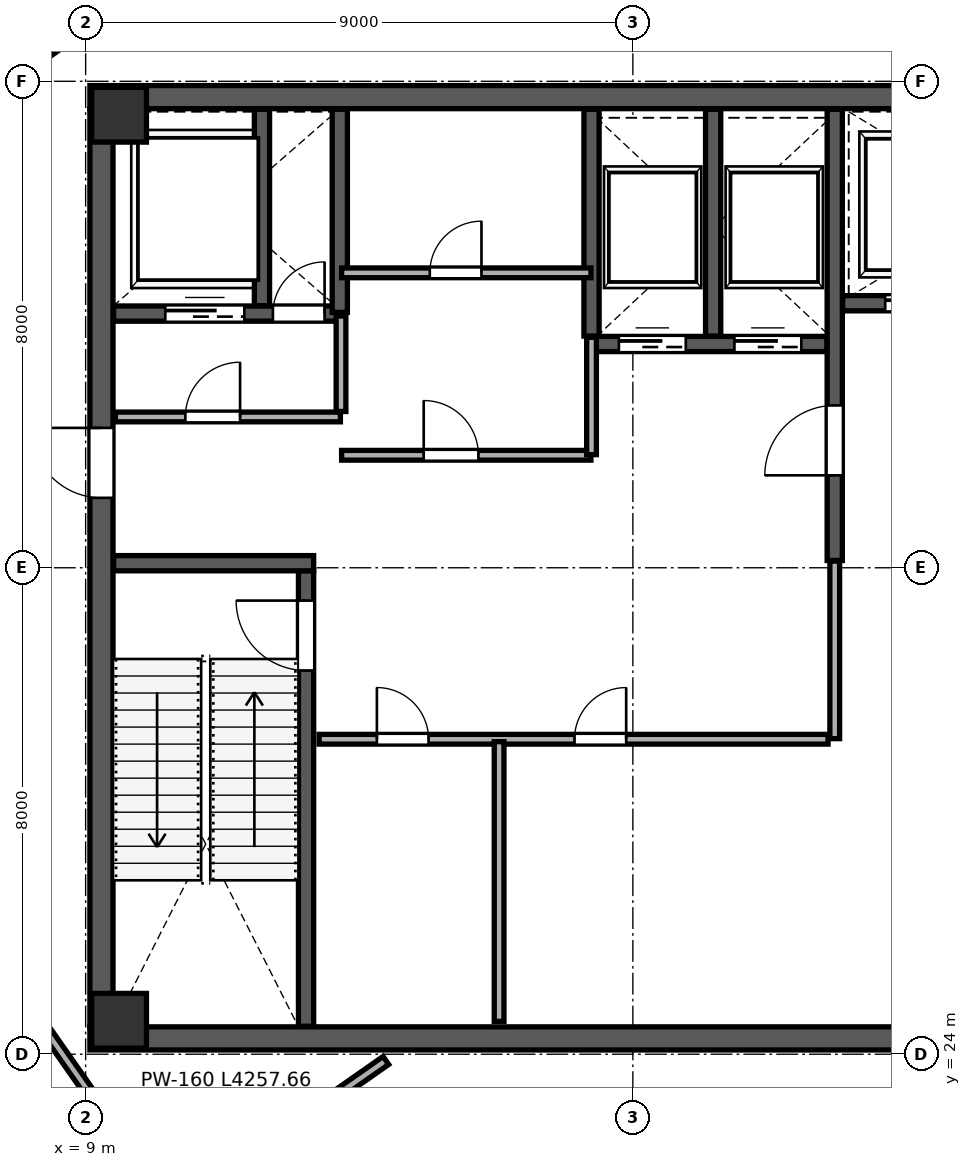
"""IFC4 building model, lengths in metres.
Left out: names, types, materials, properties, quantities, classifications, styles, units other than length and angle.
Written with IfcOpenShell. Run it as: python <this file> out.ifc"""

import sys

from ifc_helpers import new_model, si_unit, direction, frame, frame_2d, origin, origin_2d, place, context, subcontext, project, spatial, rectangle, extrude, source, transform, mapped, element, fill, save


model = new_model("IFC4")
c1 = context("Model", 3, precision=1e-05, world=origin(), true_north=direction((0.0, 1.0)))
c2 = subcontext(c1, "Body", "Model", "MODEL_VIEW")
j1 = project(units=[si_unit("LENGTHUNIT", "METRE"), si_unit("PLANEANGLEUNIT", "RADIAN")], contexts=[c1])
p1 = place(None, origin())
s1 = spatial("IfcSite", under=j1, at=p1, CompositionType="ELEMENT")
p2 = place(p1, origin())
s2 = spatial("IfcBuilding", under=s1, at=p2, CompositionType="ELEMENT")
p3 = place(p2, frame((0.0, 0.0, 293.8)))
s3 = spatial("IfcBuildingStorey", under=s2, at=p3, CompositionType="ELEMENT", Elevation=293.8)
m1 = source(origin(), c2, "Body", "SweptSolid", [
    extrude(rectangle(XDim=0.9, YDim=0.9, at=origin_2d()), origin(), (0.0, 0.0, 1.0), 4.999),
])
for number, where, z_axis, x_axis in (
    (1, (9.55, 24.55, 0.001), (0.0, 0.0, 1.0), (1.0, 0.0, 0.0)),
    (2, (9.55, 39.45, 0.001), (0.0, 0.0, 1.0), (1.0, 0.0, 0.0)),
):
    element("IfcColumn", number, at=place(p3, frame(where, z_axis=z_axis, x_axis=x_axis)), inside=s3, PredefinedType="COLUMN", context=c2, shape_type="MappedRepresentation", body=[
        mapped(m1, transform((0.0, 0.0, 0.0), scale=1.0)),
    ])
p4 = place(p3, frame((9.26, 24.45, 0.0), z_axis=(0.0, 0.0, 1.0), x_axis=(0.0, 1.0, 0.0)))
e3 = element("IfcWall", 3, at=p4, inside=s3, PredefinedType="SHEAR", context=c2, shape_type="SweptSolid", body=[
    extrude(rectangle(XDim=15.1, YDim=0.38, at=frame_2d((7.55, 0.0))), origin(), (0.0, 0.0, 1.0), 4.76),
])
p5 = place(p4, frame((8.7, 0.0, 0.0)))
e4 = element("IfcOpeningElement", 4, at=p5, cuts=e3, PredefinedType="OPENING", context=c2, shape_type="SweptSolid", body=[
    extrude(rectangle(XDim=1.15, YDim=2.2, at=frame_2d((0.575, 1.1))), frame((0.0, 0.2, 0.0), z_axis=(0.0, -1.0, 0.0), x_axis=(1.0, 0.0, 0.0)), (0.0, 0.0, 1.0), 0.4),
])
for number, where, z_axis, x_axis in (
    (5, (9.07, 24.26, 0.0), (0.0, 0.0, 1.0), (1.0, 0.0, 0.0)),
    (6, (9.07, 39.74, 0.0), (0.0, 0.0, 1.0), (1.0, 0.0, 0.0)),
):
    element("IfcWall", number, at=place(p3, frame(where, z_axis=z_axis, x_axis=x_axis)), inside=s3, PredefinedType="SHEAR", context=c2, shape_type="SweptSolid", body=[
        extrude(rectangle(XDim=17.86, YDim=0.38, at=frame_2d((8.93, 0.0))), origin(), (0.0, 0.0, 1.0), 4.76),
    ])
p6 = place(p3, frame((12.625, 24.46, 0.0), z_axis=(0.0, 0.0, 1.0), x_axis=(0.0, 1.0, 0.0)))
e7 = element("IfcWall", 7, at=p6, inside=s3, PredefinedType="SHEAR", context=c2, shape_type="SweptSolid", body=[
    extrude(rectangle(XDim=7.49, YDim=0.25, at=frame_2d((3.745, 0.0))), origin(), (0.0, 0.0, 1.0), 4.76),
])
p7 = place(p6, frame((5.85, 0.0, 0.0)))
e8 = element("IfcOpeningElement", 8, at=p7, cuts=e7, PredefinedType="OPENING", context=c2, shape_type="SweptSolid", body=[
    extrude(rectangle(XDim=1.15, YDim=2.2, at=frame_2d((0.575, 1.1))), frame((0.0, 0.135, 0.0), z_axis=(0.0, -1.0, 0.0), x_axis=(1.0, 0.0, 0.0)), (0.0, 0.0, 1.0), 0.27),
])
p8 = place(p3, frame((9.46, 32.075, 0.0), z_axis=(0.0, 0.0, 1.0), x_axis=(1.0, 0.0, 0.0)))
e9 = element("IfcWall", 9, at=p8, inside=s3, PredefinedType="SHEAR", context=c2, shape_type="SweptSolid", body=[
    extrude(rectangle(XDim=3.29, YDim=0.25, at=frame_2d((1.645, 0.0))), origin(), (0.0, 0.0, 1.0), 4.76),
])
p9 = place(p3, frame((21.32, 32.12, 0.0), z_axis=(0.0, 0.0, 1.0), x_axis=(0.0, 1.0, 0.0)))
e10 = element("IfcWall", 10, at=p9, inside=s3, PredefinedType="SHEAR", context=c2, shape_type="SweptSolid", body=[
    extrude(rectangle(XDim=7.42, YDim=0.25, at=frame_2d((3.71, 0.0))), origin(), (0.0, 0.0, 1.0), 4.76),
])
p10 = place(p9, frame((1.4, 0.0, 0.0)))
e11 = element("IfcOpeningElement", 11, at=p10, cuts=e10, PredefinedType="OPENING", context=c2, shape_type="SweptSolid", body=[
    extrude(rectangle(XDim=1.15, YDim=2.2, at=frame_2d((0.575, 1.1))), frame((0.0, 0.135, 0.0), z_axis=(0.0, -1.0, 0.0), x_axis=(1.0, 0.0, 0.0)), (0.0, 0.0, 1.0), 0.27),
])
p11 = place(p3, frame((9.46, 36.18, 0.0), z_axis=(0.0, 0.0, 1.0), x_axis=(1.0, 0.0, 0.0)))
e12 = element("IfcWall", 12, at=p11, inside=s3, PredefinedType="SHEAR", context=c2, shape_type="SweptSolid", body=[
    extrude(rectangle(XDim=3.79, YDim=0.25, at=frame_2d((1.895, 0.0))), origin(), (0.0, 0.0, 1.0), 4.76),
])
p12 = place(p11, frame((2.62, 0.0, 0.0)))
e13 = element("IfcOpeningElement", 13, at=p12, cuts=e12, PredefinedType="OPENING", context=c2, shape_type="SweptSolid", body=[
    extrude(rectangle(XDim=0.85, YDim=2.1, at=frame_2d((0.425, 1.05))), frame((0.0, 0.135, 0.0), z_axis=(0.0, -1.0, 0.0), x_axis=(1.0, 0.0, 0.0)), (0.0, 0.0, 1.0), 0.27),
])
p13 = place(p11, frame((0.85, 0.0, 0.0)))
e14 = element("IfcOpeningElement", 14, at=p13, cuts=e12, PredefinedType="OPENING", context=c2, shape_type="SweptSolid", body=[
    extrude(rectangle(XDim=1.3, YDim=2.25, at=frame_2d((0.65, 1.125))), frame((0.0, 0.135, 0.0), z_axis=(0.0, -1.0, 0.0), x_axis=(1.0, 0.0, 0.0)), (0.0, 0.0, 1.0), 0.27),
])
p14 = place(p3, frame((11.9, 36.31, 0.0), z_axis=(0.0, 0.0, 1.0), x_axis=(0.0, 1.0, 0.0)))
e15 = element("IfcWall", 15, at=p14, inside=s3, PredefinedType="SHEAR", context=c2, shape_type="SweptSolid", body=[
    extrude(rectangle(XDim=3.23, YDim=0.25, at=frame_2d((1.615, 0.0))), origin(), (0.0, 0.0, 1.0), 4.76),
])
p15 = place(p3, frame((21.45, 36.35, 0.0), z_axis=(0.0, 0.0, 1.0), x_axis=(1.0, 0.0, 0.0)))
e16 = element("IfcWall", 16, at=p15, inside=s3, PredefinedType="SHEAR", context=c2, shape_type="SweptSolid", body=[
    extrude(rectangle(XDim=5.09, YDim=0.25, at=frame_2d((2.545, 0.0))), origin(), (0.0, 0.0, 1.0), 4.76),
])
p16 = place(p15, frame((0.7, 0.0, 0.0)))
e17 = element("IfcOpeningElement", 17, at=p16, cuts=e16, PredefinedType="OPENING", context=c2, shape_type="SweptSolid", body=[
    extrude(rectangle(XDim=1.2, YDim=2.2, at=frame_2d((0.6, 1.1))), frame((0.0, 0.135, 0.0), z_axis=(0.0, -1.0, 0.0), x_axis=(1.0, 0.0, 0.0)), (0.0, 0.0, 1.0), 0.27),
])
p17 = place(p15, frame((3.25, 0.0, 0.0)))
e18 = element("IfcOpeningElement", 18, at=p17, cuts=e16, PredefinedType="OPENING", context=c2, shape_type="SweptSolid", body=[
    extrude(rectangle(XDim=1.2, YDim=2.2, at=frame_2d((0.6, 1.1))), frame((0.0, 0.135, 0.0), z_axis=(0.0, -1.0, 0.0), x_axis=(1.0, 0.0, 0.0)), (0.0, 0.0, 1.0), 0.27),
])
p18 = place(p3, frame((13.18, 36.2, 0.0), z_axis=(0.0, 0.0, 1.0), x_axis=(0.0, 1.0, 0.0)))
e19 = element("IfcWall", 19, at=p18, inside=s3, PredefinedType="SHEAR", context=c2, shape_type="SweptSolid", body=[
    extrude(rectangle(XDim=3.34, YDim=0.25, at=frame_2d((1.67, 0.0))), origin(), (0.0, 0.0, 1.0), 4.76),
])
p19 = place(p3, frame((17.32, 35.68, 0.0), z_axis=(0.0, 0.0, 1.0), x_axis=(1.0, 0.0, 0.0)))
e20 = element("IfcWall", 20, at=p19, inside=s3, PredefinedType="SHEAR", context=c2, shape_type="SweptSolid", body=[
    extrude(rectangle(XDim=3.87, YDim=0.25, at=frame_2d((1.935, 0.0))), origin(), (0.0, 0.0, 1.0), 4.76),
])
p20 = place(p19, frame((0.45, 0.0, 0.0)))
e21 = element("IfcOpeningElement", 21, at=p20, cuts=e20, PredefinedType="OPENING", context=c2, shape_type="SweptSolid", body=[
    extrude(rectangle(XDim=1.1, YDim=2.2, at=frame_2d((0.55, 1.1))), frame((0.0, 0.135, 0.0), z_axis=(0.0, -1.0, 0.0), x_axis=(1.0, 0.0, 0.0)), (0.0, 0.0, 1.0), 0.27),
])
p21 = place(p19, frame((2.35, 0.0, 0.0)))
e22 = element("IfcOpeningElement", 22, at=p21, cuts=e20, PredefinedType="OPENING", context=c2, shape_type="SweptSolid", body=[
    extrude(rectangle(XDim=1.1, YDim=2.2, at=frame_2d((0.55, 1.1))), frame((0.0, 0.135, 0.0), z_axis=(0.0, -1.0, 0.0), x_axis=(1.0, 0.0, 0.0)), (0.0, 0.0, 1.0), 0.27),
])
for number, where, z_axis, x_axis in (
    (23, (17.32, 35.81, 0.0), (0.0, 0.0, 1.0), (0.0, 1.0, 0.0)),
    (24, (19.32, 35.81, 0.0), (0.0, 0.0, 1.0), (0.0, 1.0, 0.0)),
):
    element("IfcWall", number, at=place(p3, frame(where, z_axis=z_axis, x_axis=x_axis)), inside=s3, PredefinedType="SHEAR", context=c2, shape_type="SweptSolid", body=[
        extrude(rectangle(XDim=3.73, YDim=0.25, at=frame_2d((1.865, 0.0))), origin(), (0.0, 0.0, 1.0), 4.76),
    ])
p22 = place(p3, frame((9.49, 34.48, 0.0), z_axis=(0.0, 0.0, 1.0), x_axis=(1.0, 0.0, 0.0)))
e25 = element("IfcWall", 25, at=p22, inside=s3, PredefinedType="PARTITIONING", context=c2, shape_type="SweptSolid", body=[
    extrude(rectangle(XDim=3.7, YDim=0.16, at=frame_2d((1.85, 0.0))), origin(), (0.0, 0.0, 1.0), 4.76),
])
p23 = place(p22, frame((1.15, 0.0, 0.0)))
e26 = element("IfcOpeningElement", 26, at=p23, cuts=e25, PredefinedType="OPENING", context=c2, shape_type="SweptSolid", body=[
    extrude(rectangle(XDim=0.9, YDim=2.15, at=frame_2d((0.45, 1.075))), frame((0.0, 0.09, 0.0), z_axis=(0.0, -1.0, 0.0), x_axis=(1.0, 0.0, 0.0)), (0.0, 0.0, 1.0), 0.18),
])
p24 = place(p3, frame((13.2, 34.57, 0.0), z_axis=(0.0, 0.0, 1.0), x_axis=(0.0, 1.0, 0.0)))
e27 = element("IfcWall", 27, at=p24, inside=s3, PredefinedType="PARTITIONING", context=c2, shape_type="SweptSolid", body=[
    extrude(rectangle(XDim=1.57, YDim=0.16, at=frame_2d((0.785, 0.0))), origin(), (0.0, 0.0, 1.0), 4.76),
])
p25 = place(p3, frame((13.21, 33.85, 0.0), z_axis=(0.0, 0.0, 1.0), x_axis=(1.0, 0.0, 0.0)))
e28 = element("IfcWall", 28, at=p25, inside=s3, PredefinedType="PARTITIONING", context=c2, shape_type="SweptSolid", body=[
    extrude(rectangle(XDim=4.1, YDim=0.16, at=frame_2d((2.05, 0.0))), origin(), (0.0, 0.0, 1.0), 4.76),
])
p26 = place(p25, frame((1.35, 0.0, 0.0)))
e29 = element("IfcOpeningElement", 29, at=p26, cuts=e28, PredefinedType="OPENING", context=c2, shape_type="SweptSolid", body=[
    extrude(rectangle(XDim=0.9, YDim=2.15, at=frame_2d((0.45, 1.075))), frame((0.0, 0.09, 0.0), z_axis=(0.0, -1.0, 0.0), x_axis=(1.0, 0.0, 0.0)), (0.0, 0.0, 1.0), 0.18),
])
p27 = place(p3, frame((17.32, 33.86, 0.0), z_axis=(0.0, 0.0, 1.0), x_axis=(0.0, 1.0, 0.0)))
e30 = element("IfcWall", 30, at=p27, inside=s3, PredefinedType="PARTITIONING", context=c2, shape_type="SweptSolid", body=[
    extrude(rectangle(XDim=1.93, YDim=0.16, at=frame_2d((0.965, 0.0))), origin(), (0.0, 0.0, 1.0), 4.76),
])
p28 = place(p3, frame((13.21, 36.85, 0.0), z_axis=(0.0, 0.0, 1.0), x_axis=(1.0, 0.0, 0.0)))
e31 = element("IfcWall", 31, at=p28, inside=s3, PredefinedType="PARTITIONING", context=c2, shape_type="SweptSolid", body=[
    extrude(rectangle(XDim=4.1, YDim=0.16, at=frame_2d((2.05, 0.0))), origin(), (0.0, 0.0, 1.0), 4.76),
])
p29 = place(p28, frame((1.45, 0.0, 0.0)))
e32 = element("IfcOpeningElement", 32, at=p29, cuts=e31, PredefinedType="OPENING", context=c2, shape_type="SweptSolid", body=[
    extrude(rectangle(XDim=0.85, YDim=2.1, at=frame_2d((0.425, 1.05))), frame((0.0, 0.09, 0.0), z_axis=(0.0, -1.0, 0.0), x_axis=(1.0, 0.0, 0.0)), (0.0, 0.0, 1.0), 0.18),
])
p30 = place(p3, frame((12.84, 29.18, 0.0), z_axis=(0.0, 0.0, 1.0), x_axis=(1.0, 0.0, 0.0)))
e33 = element("IfcWall", 33, at=p30, inside=s3, PredefinedType="PARTITIONING", context=c2, shape_type="SweptSolid", body=[
    extrude(rectangle(XDim=8.37, YDim=0.16, at=frame_2d((4.185, 0.0))), origin(), (0.0, 0.0, 1.0), 4.76),
])
p31 = place(p30, frame((0.95, 0.0, 0.0)))
e34 = element("IfcOpeningElement", 34, at=p31, cuts=e33, PredefinedType="OPENING", context=c2, shape_type="SweptSolid", body=[
    extrude(rectangle(XDim=0.85, YDim=2.1, at=frame_2d((0.425, 1.05))), frame((0.0, 0.09, 0.0), z_axis=(0.0, -1.0, 0.0), x_axis=(1.0, 0.0, 0.0)), (0.0, 0.0, 1.0), 0.18),
])
p32 = place(p30, frame((4.2, 0.0, 0.0)))
e35 = element("IfcOpeningElement", 35, at=p32, cuts=e33, PredefinedType="OPENING", context=c2, shape_type="SweptSolid", body=[
    extrude(rectangle(XDim=0.85, YDim=2.1, at=frame_2d((0.425, 1.05))), frame((0.0, 0.09, 0.0), z_axis=(0.0, -1.0, 0.0), x_axis=(1.0, 0.0, 0.0)), (0.0, 0.0, 1.0), 0.18),
])
p33 = place(p3, frame((15.8, 24.54, 0.0), z_axis=(0.0, 0.0, 1.0), x_axis=(0.0, 1.0, 0.0)))
e36 = element("IfcWall", 36, at=p33, inside=s3, PredefinedType="PARTITIONING", context=c2, shape_type="SweptSolid", body=[
    extrude(rectangle(XDim=4.6, YDim=0.16, at=frame_2d((2.3, 0.0))), origin(), (0.0, 0.0, 1.0), 4.76),
])
p34 = place(p3, frame((21.32, 29.19, 0.0), z_axis=(0.0, 0.0, 1.0), x_axis=(0.0, 1.0, 0.0)))
e37 = element("IfcWall", 37, at=p34, inside=s3, PredefinedType="PARTITIONING", context=c2, shape_type="SweptSolid", body=[
    extrude(rectangle(XDim=2.92, YDim=0.16, at=frame_2d((1.46, 0.0))), origin(), (0.0, 0.0, 1.0), 4.76),
])
p35 = place(p3, frame((3.758, 30.942, 0.0), z_axis=(0.0, 0.0, 1.0), x_axis=(0.573575634469, -0.819152605772, 0.0)))
e38 = element("IfcWall", 38, at=p35, inside=s3, PredefinedType="PARTITIONING", context=c2, shape_type="SweptSolid", body=[
    extrude(rectangle(XDim=11.57, YDim=0.16, at=frame_2d((5.785, 0.0))), origin(), (0.0, 0.0, 1.0), 4.76),
])
p36 = place(p35, frame((1.15, 0.0, 0.0)))
e39 = element("IfcOpeningElement", 39, at=p36, cuts=e38, PredefinedType="OPENING", context=c2, shape_type="SweptSolid", body=[
    extrude(rectangle(XDim=0.95, YDim=2.15, at=frame_2d((0.475, 1.075))), frame((0.0, 0.09, 0.0), z_axis=(0.0, -1.0, 0.0), x_axis=(1.0, 0.0, 0.0)), (0.0, 0.0, 1.0), 0.18),
])
p37 = place(p3, frame((10.45, 21.455, 0.0), z_axis=(0.0, 0.0, 1.0), x_axis=(0.819110678768, 0.573635507903, 0.0)))
e40 = element("IfcWall", 40, at=p37, inside=s3, PredefinedType="PARTITIONING", context=c2, shape_type="SweptSolid", body=[
    extrude(rectangle(XDim=4.258, YDim=0.16, at=frame_2d((2.129, 0.0))), origin(), (0.0, 0.0, 1.0), 4.76),
])
p38 = place(p3, frame((21.918, 49.884, 0.0), z_axis=(0.0, 0.0, 1.0), x_axis=(0.57358495776, -0.819146077468, 0.0)))
e41 = element("IfcWall", 41, at=p38, inside=s3, PredefinedType="PARTITIONING", context=c2, shape_type="SweptSolid", body=[
    extrude(rectangle(XDim=25.79, YDim=0.1, at=frame_2d((12.895, 0.0))), origin(), (0.0, 0.0, 1.0), 4.76),
])
p39 = place(p38, frame((9.2, 0.0, 0.0)))
e42 = element("IfcOpeningElement", 42, at=p39, cuts=e41, PredefinedType="OPENING", context=c2, shape_type="SweptSolid", body=[
    extrude(rectangle(XDim=0.95, YDim=2.15, at=frame_2d((0.475, 1.075))), frame((0.0, 0.06, 0.0), z_axis=(0.0, -1.0, 0.0), x_axis=(1.0, 0.0, 0.0)), (0.0, 0.0, 1.0), 0.12),
])
p40 = place(p3, frame((2.071, 36.036, 0.0), z_axis=(0.0, 0.0, 1.0), x_axis=(0.819154854942, 0.573572422302, 0.0)))
e43 = element("IfcWall", 43, at=p40, inside=s3, PredefinedType="PARTITIONING", context=c2, shape_type="SweptSolid", body=[
    extrude(rectangle(XDim=29.62, YDim=0.115, at=frame_2d((14.81, 0.0))), origin(), (0.0, 0.0, 1.0), 4.76),
])
p41 = place(p40, frame((4.2, 0.0, 0.0)))
e44 = element("IfcOpeningElement", 44, at=p41, cuts=e43, PredefinedType="OPENING", context=c2, shape_type="SweptSolid", body=[
    extrude(rectangle(XDim=0.95, YDim=2.15, at=frame_2d((0.475, 1.075))), frame((0.0, 0.067, 0.0), z_axis=(0.0, -1.0, 0.0), x_axis=(1.0, 0.0, 0.0)), (0.0, 0.0, 1.0), 0.135),
])
m2 = source(origin(), c2, "Body", "SweptSolid", [
    extrude(rectangle(XDim=1.15, YDim=2.2, at=frame_2d((0.575, 1.1))), frame((0.0, 0.025, 0.0), z_axis=(0.0, -1.0, 0.0), x_axis=(1.0, 0.0, 0.0)), (0.0, 0.0, 1.0), 0.05),
])
p42 = place(p7, origin())
e45 = element("IfcDoor", 45, at=p42, inside=s3, OperationType="SINGLE_SWING_RIGHT", PredefinedType="DOOR", context=c2, shape_type="MappedRepresentation", body=[
    mapped(m2, transform((0.0, 0.0, 0.0), scale=1.0)),
])
fill(e8, e45)
m3 = source(origin(), c2, "Body", "SweptSolid", [
    extrude(rectangle(XDim=1.15, YDim=2.2, at=frame_2d((0.575, 1.1))), frame((0.0, 0.025, 0.0), z_axis=(0.0, -1.0, 0.0), x_axis=(1.0, 0.0, 0.0)), (0.0, 0.0, 1.0), 0.05),
])
p43 = place(p10, origin())
e46 = element("IfcDoor", 46, at=p43, inside=s3, OperationType="SINGLE_SWING_LEFT", PredefinedType="DOOR", context=c2, shape_type="MappedRepresentation", body=[
    mapped(m3, transform((0.0, 0.0, 0.0), scale=1.0)),
])
fill(e11, e46)
p44 = place(p5, origin())
e47 = element("IfcDoor", 47, at=p44, inside=s3, OperationType="SINGLE_SWING_RIGHT", PredefinedType="DOOR", context=c2, shape_type="MappedRepresentation", body=[
    mapped(m3, transform((0.0, 0.0, 0.0), scale=1.0)),
])
fill(e4, e47)
m4 = source(origin(), c2, "Body", "SweptSolid", [
    extrude(rectangle(XDim=0.85, YDim=2.1, at=frame_2d((0.425, 1.05))), frame((0.0, 0.025, 0.0), z_axis=(0.0, -1.0, 0.0), x_axis=(1.0, 0.0, 0.0)), (0.0, 0.0, 1.0), 0.05),
])
p45 = place(p12, origin())
e48 = element("IfcDoor", 48, at=p45, inside=s3, OperationType="SINGLE_SWING_RIGHT", PredefinedType="DOOR", context=c2, shape_type="MappedRepresentation", body=[
    mapped(m4, transform((0.0, 0.0, 0.0), scale=1.0)),
])
fill(e13, e48)
m5 = source(origin(), c2, "Body", "SweptSolid", [
    extrude(rectangle(XDim=1.1, YDim=2.2, at=frame_2d((0.55, 1.1))), frame((0.0, 0.025, 0.0), z_axis=(0.0, -1.0, 0.0), x_axis=(1.0, 0.0, 0.0)), (0.0, 0.0, 1.0), 0.05),
])
p46 = place(p20, origin())
e49 = element("IfcDoor", 49, at=p46, inside=s3, OperationType="SLIDING_TO_LEFT", PredefinedType="DOOR", context=c2, shape_type="MappedRepresentation", body=[
    mapped(m5, transform((0.0, 0.0, 0.0), scale=1.0)),
])
fill(e21, e49)
p47 = place(p21, origin())
e50 = element("IfcDoor", 50, at=p47, inside=s3, OperationType="SLIDING_TO_RIGHT", PredefinedType="DOOR", context=c2, shape_type="MappedRepresentation", body=[
    mapped(m5, transform((0.0, 0.0, 0.0), scale=1.0)),
])
fill(e22, e50)
m6 = source(origin(), c2, "Body", "SweptSolid", [
    extrude(rectangle(XDim=1.2, YDim=2.2, at=frame_2d((0.6, 1.1))), frame((0.0, 0.025, 0.0), z_axis=(0.0, -1.0, 0.0), x_axis=(1.0, 0.0, 0.0)), (0.0, 0.0, 1.0), 0.05),
])
p48 = place(p16, origin())
e51 = element("IfcDoor", 51, at=p48, inside=s3, OperationType="SLIDING_TO_LEFT", PredefinedType="DOOR", context=c2, shape_type="MappedRepresentation", body=[
    mapped(m6, transform((0.0, 0.0, 0.0), scale=1.0)),
])
fill(e17, e51)
m7 = source(origin(), c2, "Body", "SweptSolid", [
    extrude(rectangle(XDim=1.3, YDim=2.25, at=frame_2d((0.65, 1.125))), frame((0.0, 0.025, 0.0), z_axis=(0.0, -1.0, 0.0), x_axis=(1.0, 0.0, 0.0)), (0.0, 0.0, 1.0), 0.05),
])
p49 = place(p13, origin())
e52 = element("IfcDoor", 52, at=p49, inside=s3, OperationType="SLIDING_TO_LEFT", PredefinedType="DOOR", context=c2, shape_type="MappedRepresentation", body=[
    mapped(m7, transform((0.0, 0.0, 0.0), scale=1.0)),
])
fill(e14, e52)
m8 = source(origin(), c2, "Body", "SweptSolid", [
    extrude(rectangle(XDim=0.9, YDim=2.15, at=frame_2d((0.45, 1.075))), frame((0.0, 0.025, 0.0), z_axis=(0.0, -1.0, 0.0), x_axis=(1.0, 0.0, 0.0)), (0.0, 0.0, 1.0), 0.05),
])
p50 = place(p23, origin())
e53 = element("IfcDoor", 53, at=p50, inside=s3, OperationType="SINGLE_SWING_RIGHT", PredefinedType="DOOR", context=c2, shape_type="MappedRepresentation", body=[
    mapped(m8, transform((0.0, 0.0, 0.0), scale=1.0)),
])
fill(e26, e53)
p51 = place(p26, origin())
e54 = element("IfcDoor", 54, at=p51, inside=s3, OperationType="SINGLE_SWING_LEFT", PredefinedType="DOOR", context=c2, shape_type="MappedRepresentation", body=[
    mapped(m8, transform((0.0, 0.0, 0.0), scale=1.0)),
])
fill(e29, e54)
p52 = place(p29, origin())
e55 = element("IfcDoor", 55, at=p52, inside=s3, OperationType="SINGLE_SWING_RIGHT", PredefinedType="DOOR", context=c2, shape_type="MappedRepresentation", body=[
    mapped(m4, transform((0.0, 0.0, 0.0), scale=1.0)),
])
fill(e32, e55)
p53 = place(p31, origin())
e56 = element("IfcDoor", 56, at=p53, inside=s3, OperationType="SINGLE_SWING_LEFT", PredefinedType="DOOR", context=c2, shape_type="MappedRepresentation", body=[
    mapped(m4, transform((0.0, 0.0, 0.0), scale=1.0)),
])
fill(e34, e56)
p54 = place(p32, origin())
e57 = element("IfcDoor", 57, at=p54, inside=s3, OperationType="SINGLE_SWING_RIGHT", PredefinedType="DOOR", context=c2, shape_type="MappedRepresentation", body=[
    mapped(m4, transform((0.0, 0.0, 0.0), scale=1.0)),
])
fill(e35, e57)
save(model, sys.argv[1])
